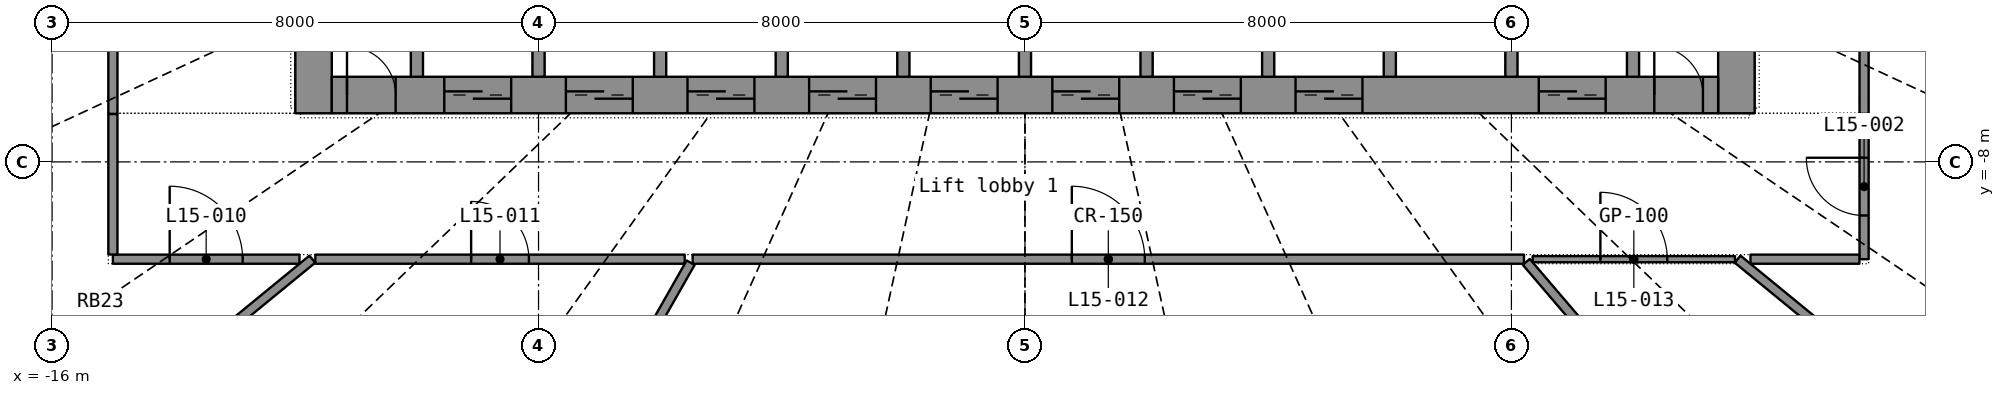
"""IFC4 building model, lengths in metres.
Left out: names, types, materials, properties, quantities, classifications, styles, units other than length and angle.
Written with IfcOpenShell. Run it as: python <this file> out.ifc"""

import sys

from ifc_helpers import new_model, si_unit, direction, frame, frame_2d, origin, place, context, subcontext, project, spatial, rectangle, extrude, element, fill, save


model = new_model("IFC4")
c1 = context("Model", 3, precision=1e-05, world=origin(), true_north=direction((0.0, 1.0)))
c2 = subcontext(c1, "Body", "Model", "MODEL_VIEW")
j1 = project(units=[si_unit("LENGTHUNIT", "METRE"), si_unit("PLANEANGLEUNIT", "RADIAN")], contexts=[c1])
p1 = place(None, origin())
s1 = spatial("IfcSite", under=j1, at=p1, CompositionType="ELEMENT")
p2 = place(p1, origin())
s2 = spatial("IfcBuilding", under=s1, at=p2, CompositionType="ELEMENT")
p3 = place(p2, frame((0.0, 0.0, 66.7)))
s3 = spatial("IfcBuildingStorey", under=s2, at=p3, CompositionType="ELEMENT", Elevation=66.7)
p4 = place(p3, frame((-11.7, -7.2, 0.0), z_axis=(0.0, 0.0, 1.0), x_axis=(0.0, 1.0, 0.0)))
e1 = element("IfcWall", 1, at=p4, inside=s3, PredefinedType="SHEAR", context=c2, shape_type="SweptSolid", body=[
    extrude(rectangle(XDim=14.4, YDim=0.6, at=frame_2d((7.2, 0.0))), origin(), (0.0, 0.0, 1.0), 3.3),
])
p5 = place(p4, frame((6.5, 0.0, 0.0)))
e2 = element("IfcOpeningElement", 2, at=p5, cuts=e1, PredefinedType="OPENING", context=c2, shape_type="SweptSolid", body=[
    extrude(rectangle(XDim=1.4, YDim=2.2, at=frame_2d((0.7, 1.1))), frame((0.0, 0.31, 0.0), z_axis=(0.0, -1.0, 0.0), x_axis=(1.0, 0.0, 0.0)), (0.0, 0.0, 1.0), 0.62),
])
p6 = place(p3, frame((11.7, -7.2, 0.0), z_axis=(0.0, 0.0, 1.0), x_axis=(0.0, 1.0, 0.0)))
e3 = element("IfcWall", 3, at=p6, inside=s3, PredefinedType="SHEAR", context=c2, shape_type="SweptSolid", body=[
    extrude(rectangle(XDim=14.4, YDim=0.6, at=frame_2d((7.2, 0.0))), origin(), (0.0, 0.0, 1.0), 3.3),
])
p7 = place(p6, frame((6.5, 0.0, 0.0)))
e4 = element("IfcOpeningElement", 4, at=p7, cuts=e3, PredefinedType="OPENING", context=c2, shape_type="SweptSolid", body=[
    extrude(rectangle(XDim=1.4, YDim=2.2, at=frame_2d((0.7, 1.1))), frame((0.0, 0.31, 0.0), z_axis=(0.0, -1.0, 0.0), x_axis=(1.0, 0.0, 0.0)), (0.0, 0.0, 1.0), 0.62),
])
p8 = place(p3, frame((-11.4, -6.9, 0.0), z_axis=(0.0, 0.0, 1.0), x_axis=(1.0, 0.0, 0.0)))
e5 = element("IfcWall", 5, at=p8, inside=s3, PredefinedType="SHEAR", context=c2, shape_type="SweptSolid", body=[
    extrude(rectangle(XDim=22.8, YDim=0.6, at=frame_2d((11.4, 0.0))), origin(), (0.0, 0.0, 1.0), 3.3),
])
p9 = place(p8, frame((1.85, 0.0, 0.0)))
e6 = element("IfcOpeningElement", 6, at=p9, cuts=e5, PredefinedType="OPENING", context=c2, shape_type="SweptSolid", body=[
    extrude(rectangle(XDim=1.1, YDim=2.2, at=frame_2d((0.55, 1.1))), frame((0.0, 0.31, 0.0), z_axis=(0.0, -1.0, 0.0), x_axis=(1.0, 0.0, 0.0)), (0.0, 0.0, 1.0), 0.62),
])
p10 = place(p8, frame((3.85, 0.0, 0.0)))
e7 = element("IfcOpeningElement", 7, at=p10, cuts=e5, PredefinedType="OPENING", context=c2, shape_type="SweptSolid", body=[
    extrude(rectangle(XDim=1.1, YDim=2.2, at=frame_2d((0.55, 1.1))), frame((0.0, 0.31, 0.0), z_axis=(0.0, -1.0, 0.0), x_axis=(1.0, 0.0, 0.0)), (0.0, 0.0, 1.0), 0.62),
])
p11 = place(p8, frame((5.85, 0.0, 0.0)))
e8 = element("IfcOpeningElement", 8, at=p11, cuts=e5, PredefinedType="OPENING", context=c2, shape_type="SweptSolid", body=[
    extrude(rectangle(XDim=1.1, YDim=2.2, at=frame_2d((0.55, 1.1))), frame((0.0, 0.31, 0.0), z_axis=(0.0, -1.0, 0.0), x_axis=(1.0, 0.0, 0.0)), (0.0, 0.0, 1.0), 0.62),
])
p12 = place(p8, frame((7.85, 0.0, 0.0)))
e9 = element("IfcOpeningElement", 9, at=p12, cuts=e5, PredefinedType="OPENING", context=c2, shape_type="SweptSolid", body=[
    extrude(rectangle(XDim=1.1, YDim=2.2, at=frame_2d((0.55, 1.1))), frame((0.0, 0.31, 0.0), z_axis=(0.0, -1.0, 0.0), x_axis=(1.0, 0.0, 0.0)), (0.0, 0.0, 1.0), 0.62),
])
p13 = place(p8, frame((9.85, 0.0, 0.0)))
e10 = element("IfcOpeningElement", 10, at=p13, cuts=e5, PredefinedType="OPENING", context=c2, shape_type="SweptSolid", body=[
    extrude(rectangle(XDim=1.1, YDim=2.2, at=frame_2d((0.55, 1.1))), frame((0.0, 0.31, 0.0), z_axis=(0.0, -1.0, 0.0), x_axis=(1.0, 0.0, 0.0)), (0.0, 0.0, 1.0), 0.62),
])
p14 = place(p8, frame((11.85, 0.0, 0.0)))
e11 = element("IfcOpeningElement", 11, at=p14, cuts=e5, PredefinedType="OPENING", context=c2, shape_type="SweptSolid", body=[
    extrude(rectangle(XDim=1.1, YDim=2.2, at=frame_2d((0.55, 1.1))), frame((0.0, 0.31, 0.0), z_axis=(0.0, -1.0, 0.0), x_axis=(1.0, 0.0, 0.0)), (0.0, 0.0, 1.0), 0.62),
])
p15 = place(p8, frame((13.85, 0.0, 0.0)))
e12 = element("IfcOpeningElement", 12, at=p15, cuts=e5, PredefinedType="OPENING", context=c2, shape_type="SweptSolid", body=[
    extrude(rectangle(XDim=1.1, YDim=2.2, at=frame_2d((0.55, 1.1))), frame((0.0, 0.31, 0.0), z_axis=(0.0, -1.0, 0.0), x_axis=(1.0, 0.0, 0.0)), (0.0, 0.0, 1.0), 0.62),
])
p16 = place(p8, frame((15.85, 0.0, 0.0)))
e13 = element("IfcOpeningElement", 13, at=p16, cuts=e5, PredefinedType="OPENING", context=c2, shape_type="SweptSolid", body=[
    extrude(rectangle(XDim=1.1, YDim=2.2, at=frame_2d((0.55, 1.1))), frame((0.0, 0.31, 0.0), z_axis=(0.0, -1.0, 0.0), x_axis=(1.0, 0.0, 0.0)), (0.0, 0.0, 1.0), 0.62),
])
p17 = place(p8, frame((19.85, 0.0, 0.0)))
e14 = element("IfcOpeningElement", 14, at=p17, cuts=e5, PredefinedType="OPENING", context=c2, shape_type="SweptSolid", body=[
    extrude(rectangle(XDim=1.1, YDim=2.2, at=frame_2d((0.55, 1.1))), frame((0.0, 0.31, 0.0), z_axis=(0.0, -1.0, 0.0), x_axis=(1.0, 0.0, 0.0)), (0.0, 0.0, 1.0), 0.62),
])
p18 = place(p8, frame((0.25, 0.0, 0.0)))
e15 = element("IfcOpeningElement", 15, at=p18, cuts=e5, PredefinedType="OPENING", context=c2, shape_type="SweptSolid", body=[
    extrude(rectangle(XDim=0.8, YDim=2.05, at=frame_2d((0.4, 1.025))), frame((0.0, 0.31, 0.0), z_axis=(0.0, -1.0, 0.0), x_axis=(1.0, 0.0, 0.0)), (0.0, 0.0, 1.0), 0.62),
])
p19 = place(p8, frame((21.75, 0.0, 0.0)))
e16 = element("IfcOpeningElement", 16, at=p19, cuts=e5, PredefinedType="OPENING", context=c2, shape_type="SweptSolid", body=[
    extrude(rectangle(XDim=0.8, YDim=2.05, at=frame_2d((0.4, 1.025))), frame((0.0, 0.31, 0.0), z_axis=(0.0, -1.0, 0.0), x_axis=(1.0, 0.0, 0.0)), (0.0, 0.0, 1.0), 0.62),
])
for number, where, z_axis, x_axis in (
    (17, (-10.0, -6.6, 0.0), (0.0, 0.0, 1.0), (0.0, 1.0, 0.0)),
    (18, (-8.0, -6.6, 0.0), (0.0, 0.0, 1.0), (0.0, 1.0, 0.0)),
    (19, (-6.0, -6.6, 0.0), (0.0, 0.0, 1.0), (0.0, 1.0, 0.0)),
    (20, (-4.0, -6.6, 0.0), (0.0, 0.0, 1.0), (0.0, 1.0, 0.0)),
    (21, (-2.0, -6.6, 0.0), (0.0, 0.0, 1.0), (0.0, 1.0, 0.0)),
    (22, (0.0, -6.6, 0.0), (0.0, 0.0, 1.0), (0.0, 1.0, 0.0)),
    (23, (2.0, -6.6, 0.0), (0.0, 0.0, 1.0), (0.0, 1.0, 0.0)),
    (24, (4.0, -6.6, 0.0), (0.0, 0.0, 1.0), (0.0, 1.0, 0.0)),
    (25, (6.0, -6.6, 0.0), (0.0, 0.0, 1.0), (0.0, 1.0, 0.0)),
    (26, (8.0, -6.6, 0.0), (0.0, 0.0, 1.0), (0.0, 1.0, 0.0)),
    (27, (10.0, -6.6, 0.0), (0.0, 0.0, 1.0), (0.0, 1.0, 0.0)),
):
    element("IfcWall", number, at=place(p3, frame(where, z_axis=z_axis, x_axis=x_axis)), inside=s3, PredefinedType="SHEAR", context=c2, shape_type="SweptSolid", body=[
        extrude(rectangle(XDim=2.7, YDim=0.2, at=frame_2d((1.35, 0.0))), origin(), (0.0, 0.0, 1.0), 3.3),
    ])
p20 = place(p3, frame((-5.465, -9.6, 0.0), z_axis=(0.0, 0.0, 1.0), x_axis=(1.0, 0.0, 0.0)))
e28 = element("IfcWall", 28, at=p20, inside=s3, PredefinedType="PARTITIONING", context=c2, shape_type="SweptSolid", body=[
    extrude(rectangle(XDim=13.672, YDim=0.15, at=frame_2d((6.836, 0.0))), origin(), (0.0, 0.0, 1.0), 2.4),
])
p21 = place(p20, frame((6.236, 0.0, 0.0)))
e29 = element("IfcOpeningElement", 29, at=p21, cuts=e28, PredefinedType="OPENING", context=c2, shape_type="SweptSolid", body=[
    extrude(rectangle(XDim=1.2, YDim=2.2, at=frame_2d((0.6, 1.1))), frame((0.0, 0.085, 0.0), z_axis=(0.0, -1.0, 0.0), x_axis=(1.0, 0.0, 0.0)), (0.0, 0.0, 1.0), 0.17),
])
p22 = place(p3, frame((-11.476, -20.159, 0.0), z_axis=(0.0, 0.0, 1.0), x_axis=(0.494734776, 0.869044016, 0.0)))
e30 = element("IfcWall", 30, at=p22, inside=s3, PredefinedType="PARTITIONING", context=c2, shape_type="SweptSolid", body=[
    extrude(rectangle(XDim=12.083, YDim=0.15, at=frame_2d((6.042, 0.0))), origin(), (0.0, 0.0, 1.0), 2.4),
])
p23 = place(p3, frame((15.577, -18.223, 0.0), z_axis=(0.0, 0.0, 1.0), x_axis=(-0.649782359, 0.76012031, 0.0)))
e31 = element("IfcWall", 31, at=p23, inside=s3, PredefinedType="PARTITIONING", context=c2, shape_type="SweptSolid", body=[
    extrude(rectangle(XDim=11.285, YDim=0.15, at=frame_2d((5.642, 0.0))), origin(), (0.0, 0.0, 1.0), 2.4),
])
p24 = place(p3, frame((-15.0, 3.217, 0.0), z_axis=(0.0, 0.0, 1.0), x_axis=(0.0, -1.0, 0.0)))
e32 = element("IfcWall", 32, at=p24, inside=s3, PredefinedType="PARTITIONING", context=c2, shape_type="SweptSolid", body=[
    extrude(rectangle(XDim=10.429, YDim=0.15, at=frame_2d((5.214, 0.0))), origin(), (0.0, 0.0, 1.0), 2.4),
])
p25 = place(p24, frame((4.615, 0.0, 0.0)))
e33 = element("IfcOpeningElement", 33, at=p25, cuts=e32, PredefinedType="OPENING", context=c2, shape_type="SweptSolid", body=[
    extrude(rectangle(XDim=1.2, YDim=2.2, at=frame_2d((0.6, 1.1))), frame((0.0, 0.085, 0.0), z_axis=(0.0, -1.0, 0.0), x_axis=(1.0, 0.0, 0.0)), (0.0, 0.0, 1.0), 0.17),
])
for number, where, z_axis, x_axis in (
    (34, (-19.207, -15.733, 0.0), (0.0, 0.0, 1.0), (0.774, 0.634, 0.0)),
    (35, (11.72, -9.6, 0.0), (0.0, 0.0, 1.0), (0.774, -0.634, 0.0)),
):
    element("IfcWall", number, at=place(p3, frame(where, z_axis=z_axis, x_axis=x_axis)), inside=s3, PredefinedType="PARTITIONING", context=c2, shape_type="SweptSolid", body=[
        extrude(rectangle(XDim=9.678, YDim=0.15, at=frame_2d((4.839, 0.0))), origin(), (0.0, 0.0, 1.0), 2.4),
    ])
p26 = place(p3, frame((-11.671, -9.6, 0.0), z_axis=(0.0, 0.0, 1.0), x_axis=(1.0, 0.0, 0.0)))
e36 = element("IfcWall", 36, at=p26, inside=s3, PredefinedType="PARTITIONING", context=c2, shape_type="SweptSolid", body=[
    extrude(rectangle(XDim=6.074, YDim=0.15, at=frame_2d((3.037, 0.0))), origin(), (0.0, 0.0, 1.0), 2.4),
])
p27 = place(p26, frame((2.562, 0.0, 0.0)))
e37 = element("IfcOpeningElement", 37, at=p27, cuts=e36, PredefinedType="OPENING", context=c2, shape_type="SweptSolid", body=[
    extrude(rectangle(XDim=0.95, YDim=2.15, at=frame_2d((0.475, 1.075))), frame((0.0, 0.085, 0.0), z_axis=(0.0, -1.0, 0.0), x_axis=(1.0, 0.0, 0.0)), (0.0, 0.0, 1.0), 0.17),
])
p28 = place(p3, frame((13.8, -7.212, 0.0), z_axis=(0.0, 0.0, 1.0), x_axis=(0.0, 1.0, 0.0)))
e38 = element("IfcWall", 38, at=p28, inside=s3, PredefinedType="PARTITIONING", context=c2, shape_type="SweptSolid", body=[
    extrude(rectangle(XDim=4.088, YDim=0.15, at=frame_2d((2.044, 0.0))), origin(), (0.0, 0.0, 1.0), 2.4),
])
p29 = place(p28, frame((1.569, 0.0, 0.0)))
e39 = element("IfcOpeningElement", 39, at=p29, cuts=e38, PredefinedType="OPENING", context=c2, shape_type="SweptSolid", body=[
    extrude(rectangle(XDim=0.95, YDim=2.15, at=frame_2d((0.475, 1.075))), frame((0.0, 0.085, 0.0), z_axis=(0.0, -1.0, 0.0), x_axis=(1.0, 0.0, 0.0)), (0.0, 0.0, 1.0), 0.17),
])
p30 = place(p3, frame((8.35, -9.6, 0.0), z_axis=(0.0, 0.0, 1.0), x_axis=(1.0, 0.0, 0.0)))
e40 = element("IfcWall", 40, at=p30, inside=s3, PredefinedType="PARTITIONING", context=c2, shape_type="SweptSolid", body=[
    extrude(rectangle(XDim=3.327, YDim=0.1, at=frame_2d((1.664, 0.0))), origin(), (0.0, 0.0, 1.0), 2.4),
])
p31 = place(p30, frame((1.114, 0.0, 0.0)))
e41 = element("IfcOpeningElement", 41, at=p31, cuts=e40, PredefinedType="OPENING", context=c2, shape_type="SweptSolid", body=[
    extrude(rectangle(XDim=1.1, YDim=2.2, at=frame_2d((0.55, 1.1))), frame((0.0, 0.06, 0.0), z_axis=(0.0, -1.0, 0.0), x_axis=(1.0, 0.0, 0.0)), (0.0, 0.0, 1.0), 0.12),
])
p32 = place(p3, frame((-15.0, -9.6, 0.0), z_axis=(0.0, 0.0, 1.0), x_axis=(1.0, 0.0, 0.0)))
e42 = element("IfcWall", 42, at=p32, inside=s3, PredefinedType="PARTITIONING", context=c2, shape_type="SweptSolid", body=[
    extrude(rectangle(XDim=3.068, YDim=0.15, at=frame_2d((1.534, 0.0))), origin(), (0.0, 0.0, 1.0), 2.4),
])
p33 = place(p32, frame((0.934, 0.0, 0.0)))
e43 = element("IfcOpeningElement", 43, at=p33, cuts=e42, PredefinedType="OPENING", context=c2, shape_type="SweptSolid", body=[
    extrude(rectangle(XDim=1.2, YDim=2.2, at=frame_2d((0.6, 1.1))), frame((0.0, 0.085, 0.0), z_axis=(0.0, -1.0, 0.0), x_axis=(1.0, 0.0, 0.0)), (0.0, 0.0, 1.0), 0.17),
])
p34 = place(p3, frame((-15.0, -7.213, 0.0), z_axis=(0.0, 0.0, 1.0), x_axis=(0.0, -1.0, 0.0)))
e44 = element("IfcWall", 44, at=p34, inside=s3, PredefinedType="PARTITIONING", context=c2, shape_type="SweptSolid", body=[
    extrude(rectangle(XDim=2.31, YDim=0.15, at=frame_2d((1.155, 0.0))), origin(), (0.0, 0.0, 1.0), 2.4),
])
p35 = place(p3, frame((13.8, -9.6, 0.0), z_axis=(0.0, 0.0, 1.0), x_axis=(0.0, 1.0, 0.0)))
e45 = element("IfcWall", 45, at=p35, inside=s3, PredefinedType="PARTITIONING", context=c2, shape_type="SweptSolid", body=[
    extrude(rectangle(XDim=2.387, YDim=0.15, at=frame_2d((1.194, 0.0))), origin(), (0.0, 0.0, 1.0), 2.4),
])
p36 = place(p35, frame((0.719, 0.0, 0.0)))
e46 = element("IfcOpeningElement", 46, at=p36, cuts=e45, PredefinedType="OPENING", context=c2, shape_type="SweptSolid", body=[
    extrude(rectangle(XDim=0.95, YDim=2.15, at=frame_2d((0.475, 1.075))), frame((0.0, 0.085, 0.0), z_axis=(0.0, -1.0, 0.0), x_axis=(1.0, 0.0, 0.0)), (0.0, 0.0, 1.0), 0.17),
])
p37 = place(p3, frame((11.932, -9.6, 0.0), z_axis=(0.0, 0.0, 1.0), x_axis=(1.0, 0.0, 0.0)))
e47 = element("IfcWall", 47, at=p37, inside=s3, PredefinedType="PARTITIONING", context=c2, shape_type="SweptSolid", body=[
    extrude(rectangle(XDim=1.791, YDim=0.15, at=frame_2d((0.896, 0.0))), origin(), (0.0, 0.0, 1.0), 2.4),
])
p38 = place(p9, origin())
e48 = element("IfcDoor", 48, at=p38, inside=s3, OperationType="DOUBLE_DOOR_SLIDING", PredefinedType="DOOR", context=c2, shape_type="SweptSolid", body=[
    extrude(rectangle(XDim=1.1, YDim=2.2, at=frame_2d((0.55, 1.1))), frame((0.0, 0.025, 0.0), z_axis=(0.0, -1.0, 0.0), x_axis=(1.0, 0.0, 0.0)), (0.0, 0.0, 1.0), 0.05),
])
fill(e6, e48)
p39 = place(p10, origin())
e49 = element("IfcDoor", 49, at=p39, inside=s3, OperationType="DOUBLE_DOOR_SLIDING", PredefinedType="DOOR", context=c2, shape_type="SweptSolid", body=[
    extrude(rectangle(XDim=1.1, YDim=2.2, at=frame_2d((0.55, 1.1))), frame((0.0, 0.025, 0.0), z_axis=(0.0, -1.0, 0.0), x_axis=(1.0, 0.0, 0.0)), (0.0, 0.0, 1.0), 0.05),
])
fill(e7, e49)
p40 = place(p11, origin())
e50 = element("IfcDoor", 50, at=p40, inside=s3, OperationType="DOUBLE_DOOR_SLIDING", PredefinedType="DOOR", context=c2, shape_type="SweptSolid", body=[
    extrude(rectangle(XDim=1.1, YDim=2.2, at=frame_2d((0.55, 1.1))), frame((0.0, 0.025, 0.0), z_axis=(0.0, -1.0, 0.0), x_axis=(1.0, 0.0, 0.0)), (0.0, 0.0, 1.0), 0.05),
])
fill(e8, e50)
p41 = place(p12, origin())
e51 = element("IfcDoor", 51, at=p41, inside=s3, OperationType="DOUBLE_DOOR_SLIDING", PredefinedType="DOOR", context=c2, shape_type="SweptSolid", body=[
    extrude(rectangle(XDim=1.1, YDim=2.2, at=frame_2d((0.55, 1.1))), frame((0.0, 0.025, 0.0), z_axis=(0.0, -1.0, 0.0), x_axis=(1.0, 0.0, 0.0)), (0.0, 0.0, 1.0), 0.05),
])
fill(e9, e51)
p42 = place(p13, origin())
e52 = element("IfcDoor", 52, at=p42, inside=s3, OperationType="DOUBLE_DOOR_SLIDING", PredefinedType="DOOR", context=c2, shape_type="SweptSolid", body=[
    extrude(rectangle(XDim=1.1, YDim=2.2, at=frame_2d((0.55, 1.1))), frame((0.0, 0.025, 0.0), z_axis=(0.0, -1.0, 0.0), x_axis=(1.0, 0.0, 0.0)), (0.0, 0.0, 1.0), 0.05),
])
fill(e10, e52)
p43 = place(p14, origin())
e53 = element("IfcDoor", 53, at=p43, inside=s3, OperationType="DOUBLE_DOOR_SLIDING", PredefinedType="DOOR", context=c2, shape_type="SweptSolid", body=[
    extrude(rectangle(XDim=1.1, YDim=2.2, at=frame_2d((0.55, 1.1))), frame((0.0, 0.025, 0.0), z_axis=(0.0, -1.0, 0.0), x_axis=(1.0, 0.0, 0.0)), (0.0, 0.0, 1.0), 0.05),
])
fill(e11, e53)
p44 = place(p15, origin())
e54 = element("IfcDoor", 54, at=p44, inside=s3, OperationType="DOUBLE_DOOR_SLIDING", PredefinedType="DOOR", context=c2, shape_type="SweptSolid", body=[
    extrude(rectangle(XDim=1.1, YDim=2.2, at=frame_2d((0.55, 1.1))), frame((0.0, 0.025, 0.0), z_axis=(0.0, -1.0, 0.0), x_axis=(1.0, 0.0, 0.0)), (0.0, 0.0, 1.0), 0.05),
])
fill(e12, e54)
p45 = place(p16, origin())
e55 = element("IfcDoor", 55, at=p45, inside=s3, OperationType="DOUBLE_DOOR_SLIDING", PredefinedType="DOOR", context=c2, shape_type="SweptSolid", body=[
    extrude(rectangle(XDim=1.1, YDim=2.2, at=frame_2d((0.55, 1.1))), frame((0.0, 0.025, 0.0), z_axis=(0.0, -1.0, 0.0), x_axis=(1.0, 0.0, 0.0)), (0.0, 0.0, 1.0), 0.05),
])
fill(e13, e55)
p46 = place(p17, origin())
e56 = element("IfcDoor", 56, at=p46, inside=s3, OperationType="DOUBLE_DOOR_SLIDING", PredefinedType="DOOR", context=c2, shape_type="SweptSolid", body=[
    extrude(rectangle(XDim=1.1, YDim=2.2, at=frame_2d((0.55, 1.1))), frame((0.0, 0.025, 0.0), z_axis=(0.0, -1.0, 0.0), x_axis=(1.0, 0.0, 0.0)), (0.0, 0.0, 1.0), 0.05),
])
fill(e14, e56)
p47 = place(p18, origin())
e57 = element("IfcDoor", 57, at=p47, inside=s3, OperationType="SINGLE_SWING_LEFT", PredefinedType="DOOR", context=c2, shape_type="SweptSolid", body=[
    extrude(rectangle(XDim=0.8, YDim=2.05, at=frame_2d((0.4, 1.025))), frame((0.0, 0.025, 0.0), z_axis=(0.0, -1.0, 0.0), x_axis=(1.0, 0.0, 0.0)), (0.0, 0.0, 1.0), 0.05),
])
fill(e15, e57)
p48 = place(p19, origin())
e58 = element("IfcDoor", 58, at=p48, inside=s3, OperationType="SINGLE_SWING_LEFT", PredefinedType="DOOR", context=c2, shape_type="SweptSolid", body=[
    extrude(rectangle(XDim=0.8, YDim=2.05, at=frame_2d((0.4, 1.025))), frame((0.0, 0.025, 0.0), z_axis=(0.0, -1.0, 0.0), x_axis=(1.0, 0.0, 0.0)), (0.0, 0.0, 1.0), 0.05),
])
fill(e16, e58)
p49 = place(p36, origin())
e59 = element("IfcDoor", 59, at=p49, inside=s3, OperationType="SINGLE_SWING_RIGHT", PredefinedType="DOOR", context=c2, shape_type="SweptSolid", body=[
    extrude(rectangle(XDim=0.95, YDim=2.15, at=frame_2d((0.475, 1.075))), frame((0.0, 0.025, 0.0), z_axis=(0.0, -1.0, 0.0), x_axis=(1.0, 0.0, 0.0)), (0.0, 0.0, 1.0), 0.05),
])
fill(e46, e59)
p50 = place(p33, origin())
e60 = element("IfcDoor", 60, at=p50, inside=s3, OperationType="DOUBLE_DOOR_SINGLE_SWING", PredefinedType="DOOR", context=c2, shape_type="SweptSolid", body=[
    extrude(rectangle(XDim=1.2, YDim=2.2, at=frame_2d((0.6, 1.1))), frame((0.0, 0.025, 0.0), z_axis=(0.0, -1.0, 0.0), x_axis=(1.0, 0.0, 0.0)), (0.0, 0.0, 1.0), 0.05),
])
fill(e43, e60)
p51 = place(p27, origin())
e61 = element("IfcDoor", 61, at=p51, inside=s3, OperationType="SINGLE_SWING_LEFT", PredefinedType="DOOR", context=c2, shape_type="SweptSolid", body=[
    extrude(rectangle(XDim=0.95, YDim=2.15, at=frame_2d((0.475, 1.075))), frame((0.0, 0.025, 0.0), z_axis=(0.0, -1.0, 0.0), x_axis=(1.0, 0.0, 0.0)), (0.0, 0.0, 1.0), 0.05),
])
fill(e37, e61)
p52 = place(p21, origin())
e62 = element("IfcDoor", 62, at=p52, inside=s3, OperationType="DOUBLE_DOOR_SINGLE_SWING", PredefinedType="DOOR", context=c2, shape_type="SweptSolid", body=[
    extrude(rectangle(XDim=1.2, YDim=2.2, at=frame_2d((0.6, 1.1))), frame((0.0, 0.025, 0.0), z_axis=(0.0, -1.0, 0.0), x_axis=(1.0, 0.0, 0.0)), (0.0, 0.0, 1.0), 0.05),
])
fill(e29, e62)
p53 = place(p31, origin())
e63 = element("IfcDoor", 63, at=p53, inside=s3, OperationType="SINGLE_SWING_LEFT", PredefinedType="DOOR", context=c2, shape_type="SweptSolid", body=[
    extrude(rectangle(XDim=1.1, YDim=2.2, at=frame_2d((0.55, 1.1))), frame((0.0, 0.025, 0.0), z_axis=(0.0, -1.0, 0.0), x_axis=(1.0, 0.0, 0.0)), (0.0, 0.0, 1.0), 0.05),
])
fill(e41, e63)
save(model, sys.argv[1])
